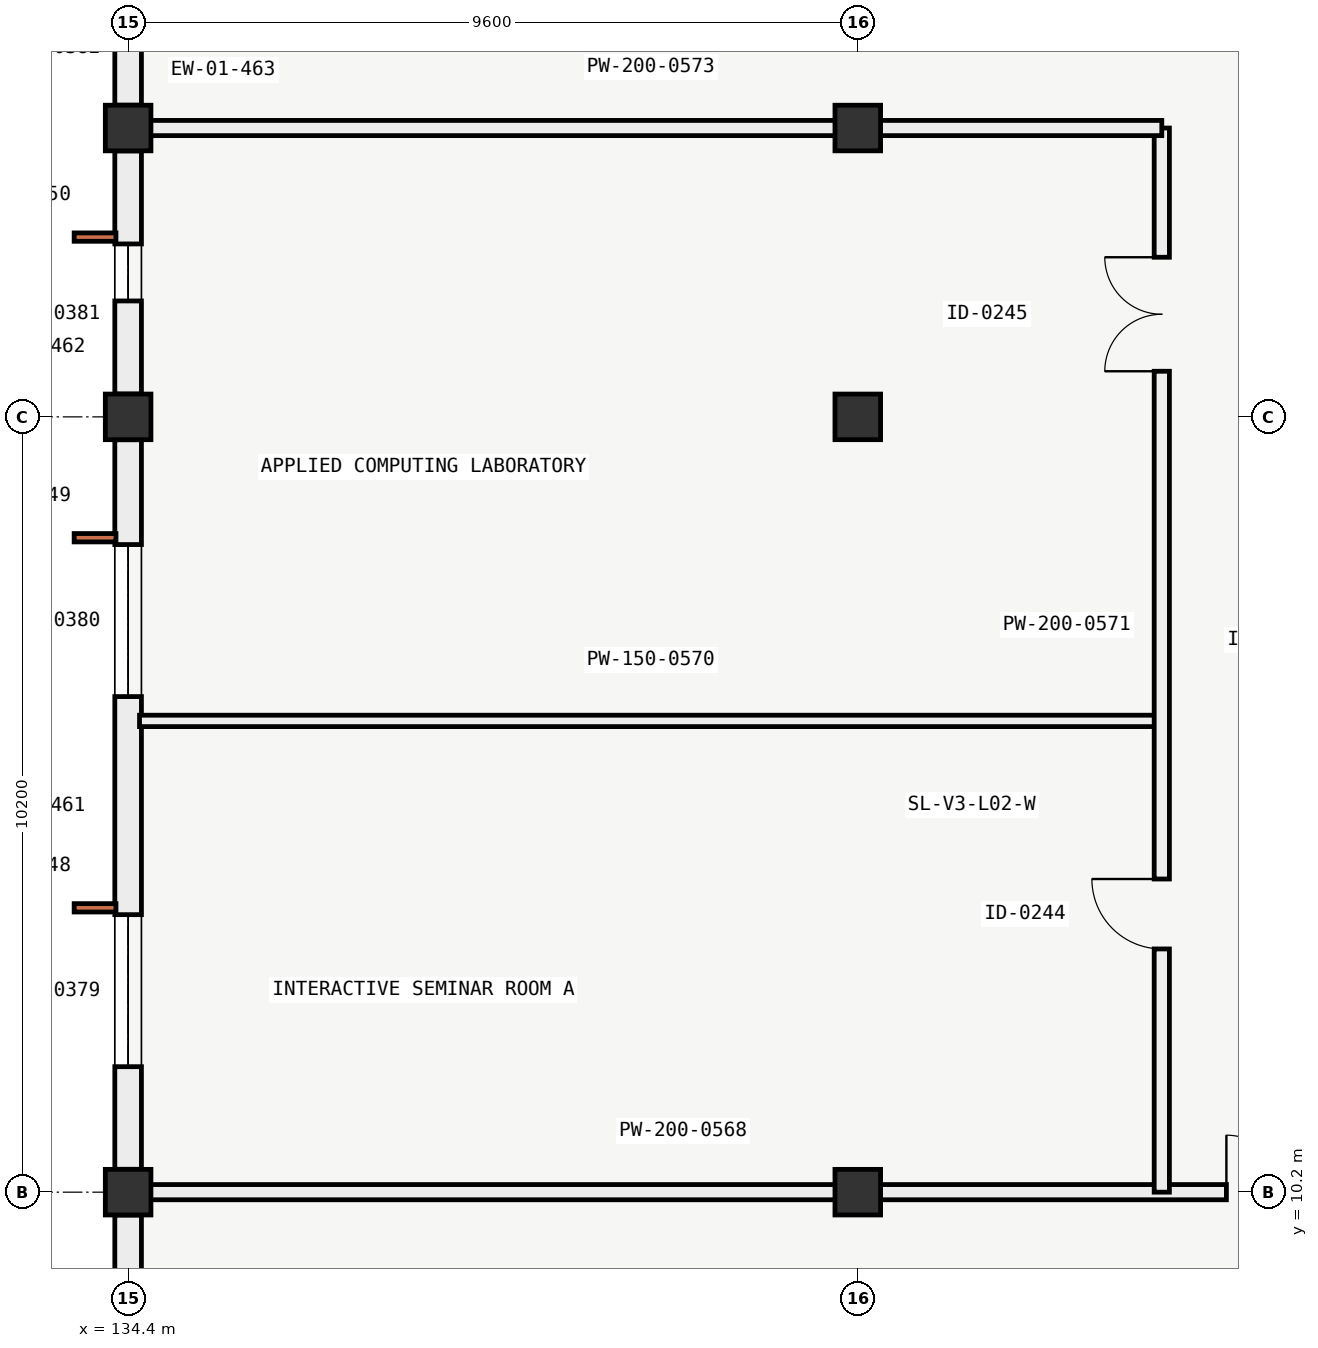
"""IFC4 building model, lengths in metres.
Left out: names, types, materials, properties, quantities, classifications, styles, units other than length and angle.
Written with IfcOpenShell. Run it as: python <this file> out.ifc"""

import sys

from ifc_helpers import new_model, si_unit, direction, frame, frame_2d, origin, origin_2d, place, context, subcontext, project, spatial, rectangle, extrude, element, fill, save


model = new_model("IFC4")
c1 = context("Model", 3, precision=1e-05, world=origin(), true_north=direction((0.0, 1.0)))
c2 = subcontext(c1, "Body", "Model", "MODEL_VIEW")
j1 = project(units=[si_unit("LENGTHUNIT", "METRE"), si_unit("PLANEANGLEUNIT", "RADIAN")], contexts=[c1])
p1 = place(None, origin())
s1 = spatial("IfcSite", under=j1, at=p1, CompositionType="ELEMENT")
p2 = place(p1, origin())
s2 = spatial("IfcBuilding", under=s1, at=p2, CompositionType="ELEMENT")
p3 = place(p2, frame((0.0, 0.0, 9.6)))
s3 = spatial("IfcBuildingStorey", under=s2, at=p3, CompositionType="ELEMENT", Elevation=9.6)
for number, where, z_axis, x_axis in (
    (1, (134.4, 10.2, 0.0), (0.0, 0.0, 1.0), (1.0, 0.0, 0.0)),
    (2, (134.4, 20.4, 0.0), (0.0, 0.0, 1.0), (1.0, 0.0, 0.0)),
    (3, (134.4, 24.2, 0.0), (0.0, 0.0, 1.0), (1.0, 0.0, 0.0)),
    (4, (144.0, 10.2, 0.0), (0.0, 0.0, 1.0), (1.0, 0.0, 0.0)),
    (5, (144.0, 20.4, 0.0), (0.0, 0.0, 1.0), (1.0, 0.0, 0.0)),
    (6, (144.0, 24.2, 0.0), (0.0, 0.0, 1.0), (1.0, 0.0, 0.0)),
):
    element("IfcColumn", number, at=place(p3, frame(where, z_axis=z_axis, x_axis=x_axis)), inside=s3, PredefinedType="COLUMN", context=c2, shape_type="SweptSolid", body=[
        extrude(rectangle(XDim=0.6, YDim=0.6, at=origin_2d()), origin(), (0.0, 0.0, 1.0), 4.2),
    ])
p4 = place(p3, frame((134.4, 0.301, 0.0), z_axis=(0.0, 0.0, 1.0), x_axis=(0.0, 1.0, 0.0)))
e7 = element("IfcWall", 7, at=p4, inside=s3, PredefinedType="SOLIDWALL", context=c2, shape_type="SweptSolid", body=[
    extrude(rectangle(XDim=9.598, YDim=0.35, at=frame_2d((4.799, 0.0))), origin(), (0.0, 0.0, 1.0), 3.25),
])
p5 = place(p4, frame((1.35, 0.0, 0.85)))
e8 = element("IfcOpeningElement", 8, at=p5, cuts=e7, PredefinedType="OPENING", context=c2, shape_type="SweptSolid", body=[
    extrude(rectangle(XDim=2.0, YDim=1.35, at=frame_2d((1.0, 0.675))), frame((0.0, 0.185, 0.0), z_axis=(0.0, -1.0, 0.0), x_axis=(1.0, 0.0, 0.0)), (0.0, 0.0, 1.0), 0.37),
])
p6 = place(p4, frame((5.25, 0.0, 0.85)))
e9 = element("IfcOpeningElement", 9, at=p6, cuts=e7, PredefinedType="OPENING", context=c2, shape_type="SweptSolid", body=[
    extrude(rectangle(XDim=2.0, YDim=1.35, at=frame_2d((1.0, 0.675))), frame((0.0, 0.185, 0.0), z_axis=(0.0, -1.0, 0.0), x_axis=(1.0, 0.0, 0.0)), (0.0, 0.0, 1.0), 0.37),
])
p7 = place(p3, frame((134.4, 10.501, 0.0), z_axis=(0.0, 0.0, 1.0), x_axis=(0.0, 1.0, 0.0)))
e10 = element("IfcWall", 10, at=p7, inside=s3, PredefinedType="SOLIDWALL", context=c2, shape_type="SweptSolid", body=[
    extrude(rectangle(XDim=9.598, YDim=0.35, at=frame_2d((4.799, 0.0))), origin(), (0.0, 0.0, 1.0), 3.25),
])
p8 = place(p7, frame((1.35, 0.0, 0.85)))
e11 = element("IfcOpeningElement", 11, at=p8, cuts=e10, PredefinedType="OPENING", context=c2, shape_type="SweptSolid", body=[
    extrude(rectangle(XDim=2.0, YDim=1.35, at=frame_2d((1.0, 0.675))), frame((0.0, 0.185, 0.0), z_axis=(0.0, -1.0, 0.0), x_axis=(1.0, 0.0, 0.0)), (0.0, 0.0, 1.0), 0.37),
])
p9 = place(p7, frame((6.219, 0.0, 0.85)))
e12 = element("IfcOpeningElement", 12, at=p9, cuts=e10, PredefinedType="OPENING", context=c2, shape_type="SweptSolid", body=[
    extrude(rectangle(XDim=2.0, YDim=1.35, at=frame_2d((1.0, 0.675))), frame((0.0, 0.185, 0.0), z_axis=(0.0, -1.0, 0.0), x_axis=(1.0, 0.0, 0.0)), (0.0, 0.0, 1.0), 0.37),
])
p10 = place(p3, frame((134.4, 20.701, 0.0), z_axis=(0.0, 0.0, 1.0), x_axis=(0.0, 1.0, 0.0)))
e13 = element("IfcWall", 13, at=p10, inside=s3, PredefinedType="SOLIDWALL", context=c2, shape_type="SweptSolid", body=[
    extrude(rectangle(XDim=3.198, YDim=0.35, at=frame_2d((1.599, 0.0))), origin(), (0.0, 0.0, 1.0), 2.33),
])
p11 = place(p10, frame((1.224, 0.0, 0.9)))
e14 = element("IfcOpeningElement", 14, at=p11, cuts=e13, PredefinedType="OPENING", context=c2, shape_type="SweptSolid", body=[
    extrude(rectangle(XDim=0.75, YDim=1.1, at=frame_2d((0.375, 0.55))), frame((0.0, 0.185, 0.0), z_axis=(0.0, -1.0, 0.0), x_axis=(1.0, 0.0, 0.0)), (0.0, 0.0, 1.0), 0.37),
])
p12 = place(p3, frame((134.4, 24.501, 0.0), z_axis=(0.0, 0.0, 1.0), x_axis=(0.0, 1.0, 0.0)))
e15 = element("IfcWall", 15, at=p12, inside=s3, PredefinedType="SOLIDWALL", context=c2, shape_type="SweptSolid", body=[
    extrude(rectangle(XDim=2.598, YDim=0.35, at=frame_2d((1.299, 0.0))), origin(), (0.0, 0.0, 1.0), 2.33),
])
p13 = place(p12, frame((0.924, 0.0, 0.75)))
e16 = element("IfcOpeningElement", 16, at=p13, cuts=e15, PredefinedType="OPENING", context=c2, shape_type="SweptSolid", body=[
    extrude(rectangle(XDim=0.75, YDim=1.1, at=frame_2d((0.375, 0.55))), frame((0.0, 0.185, 0.0), z_axis=(0.0, -1.0, 0.0), x_axis=(1.0, 0.0, 0.0)), (0.0, 0.0, 1.0), 0.37),
])
p14 = place(p3, frame((134.55, 10.2, 0.0), z_axis=(0.0, 0.0, 1.0), x_axis=(1.0, 0.0, 0.0)))
e17 = element("IfcWall", 17, at=p14, inside=s3, PredefinedType="PARTITIONING", context=c2, shape_type="SweptSolid", body=[
    extrude(rectangle(XDim=19.05, YDim=0.2, at=frame_2d((9.525, 0.0))), origin(), (0.0, 0.0, 1.0), 3.23),
])
p15 = place(p14, frame((14.3, 0.0, 0.0)))
e18 = element("IfcOpeningElement", 18, at=p15, cuts=e17, PredefinedType="OPENING", context=c2, shape_type="SweptSolid", body=[
    extrude(rectangle(XDim=1.5, YDim=2.2, at=frame_2d((0.75, 1.1))), frame((0.0, 0.11, 0.0), z_axis=(0.0, -1.0, 0.0), x_axis=(1.0, 0.0, 0.0)), (0.0, 0.0, 1.0), 0.22),
])
p16 = place(p3, frame((134.55, 16.4, 0.0), z_axis=(0.0, 0.0, 1.0), x_axis=(1.0, 0.0, 0.0)))
e19 = element("IfcWall", 19, at=p16, inside=s3, PredefinedType="PARTITIONING", context=c2, shape_type="SweptSolid", body=[
    extrude(rectangle(XDim=13.45, YDim=0.15, at=frame_2d((6.725, 0.0))), origin(), (0.0, 0.0, 1.0), 3.28),
])
p17 = place(p3, frame((148.0, 10.2, 0.0), z_axis=(0.0, 0.0, 1.0), x_axis=(0.0, 1.0, 0.0)))
e20 = element("IfcWall", 20, at=p17, inside=s3, PredefinedType="PARTITIONING", context=c2, shape_type="SweptSolid", body=[
    extrude(rectangle(XDim=14.0, YDim=0.2, at=frame_2d((7.0, 0.0))), origin(), (0.0, 0.0, 1.0), 3.23),
])
p18 = place(p17, frame((3.2, 0.0, 0.0)))
e21 = element("IfcOpeningElement", 21, at=p18, cuts=e20, PredefinedType="OPENING", context=c2, shape_type="SweptSolid", body=[
    extrude(rectangle(XDim=0.92, YDim=2.1, at=frame_2d((0.46, 1.05))), frame((0.0, 0.11, 0.0), z_axis=(0.0, -1.0, 0.0), x_axis=(1.0, 0.0, 0.0)), (0.0, 0.0, 1.0), 0.22),
])
p19 = place(p17, frame((10.8, 0.0, 0.0)))
e22 = element("IfcOpeningElement", 22, at=p19, cuts=e20, PredefinedType="OPENING", context=c2, shape_type="SweptSolid", body=[
    extrude(rectangle(XDim=1.5, YDim=2.2, at=frame_2d((0.75, 1.1))), frame((0.0, 0.11, 0.0), z_axis=(0.0, -1.0, 0.0), x_axis=(1.0, 0.0, 0.0)), (0.0, 0.0, 1.0), 0.22),
])
p20 = place(p3, frame((134.55, 24.2, 0.0), z_axis=(0.0, 0.0, 1.0), x_axis=(1.0, 0.0, 0.0)))
e23 = element("IfcWall", 23, at=p20, inside=s3, PredefinedType="PARTITIONING", context=c2, shape_type="SweptSolid", body=[
    extrude(rectangle(XDim=13.45, YDim=0.2, at=frame_2d((6.725, 0.0))), origin(), (0.0, 0.0, 1.0), 2.33),
])
p21 = place(p8, origin())
e24 = element("IfcWindow", 24, at=p21, inside=s3, PartitioningType="SINGLE_PANEL", PredefinedType="WINDOW", context=c2, shape_type="SweptSolid", body=[
    extrude(rectangle(XDim=2.0, YDim=1.35, at=frame_2d((1.0, 0.675))), frame((0.0, 0.03, 0.0), z_axis=(0.0, -1.0, 0.0), x_axis=(1.0, 0.0, 0.0)), (0.0, 0.0, 1.0), 0.06),
])
fill(e11, e24)
p22 = place(p9, origin())
e25 = element("IfcWindow", 25, at=p22, inside=s3, PartitioningType="SINGLE_PANEL", PredefinedType="WINDOW", context=c2, shape_type="SweptSolid", body=[
    extrude(rectangle(XDim=2.0, YDim=1.35, at=frame_2d((1.0, 0.675))), frame((0.0, 0.03, 0.0), z_axis=(0.0, -1.0, 0.0), x_axis=(1.0, 0.0, 0.0)), (0.0, 0.0, 1.0), 0.06),
])
fill(e12, e25)
p23 = place(p11, origin())
e26 = element("IfcWindow", 26, at=p23, inside=s3, PartitioningType="SINGLE_PANEL", PredefinedType="WINDOW", context=c2, shape_type="SweptSolid", body=[
    extrude(rectangle(XDim=0.75, YDim=1.1, at=frame_2d((0.375, 0.55))), frame((0.0, 0.03, 0.0), z_axis=(0.0, -1.0, 0.0), x_axis=(1.0, 0.0, 0.0)), (0.0, 0.0, 1.0), 0.06),
])
fill(e14, e26)
p24 = place(p15, origin())
e27 = element("IfcDoor", 27, at=p24, inside=s3, OperationType="DOUBLE_DOOR_SINGLE_SWING", PredefinedType="DOOR", context=c2, shape_type="SweptSolid", body=[
    extrude(rectangle(XDim=1.5, YDim=2.2, at=frame_2d((0.75, 1.1))), frame((0.0, 0.025, 0.0), z_axis=(0.0, -1.0, 0.0), x_axis=(1.0, 0.0, 0.0)), (0.0, 0.0, 1.0), 0.05),
])
fill(e18, e27)
p25 = place(p18, origin())
e28 = element("IfcDoor", 28, at=p25, inside=s3, OperationType="SINGLE_SWING_RIGHT", PredefinedType="DOOR", context=c2, shape_type="SweptSolid", body=[
    extrude(rectangle(XDim=0.92, YDim=2.1, at=frame_2d((0.46, 1.05))), frame((0.0, 0.025, 0.0), z_axis=(0.0, -1.0, 0.0), x_axis=(1.0, 0.0, 0.0)), (0.0, 0.0, 1.0), 0.05),
])
fill(e21, e28)
p26 = place(p19, origin())
e29 = element("IfcDoor", 29, at=p26, inside=s3, OperationType="DOUBLE_DOOR_SINGLE_SWING", PredefinedType="DOOR", context=c2, shape_type="SweptSolid", body=[
    extrude(rectangle(XDim=1.5, YDim=2.2, at=frame_2d((0.75, 1.1))), frame((0.0, 0.025, 0.0), z_axis=(0.0, -1.0, 0.0), x_axis=(1.0, 0.0, 0.0)), (0.0, 0.0, 1.0), 0.05),
])
fill(e22, e29)
save(model, sys.argv[1])
